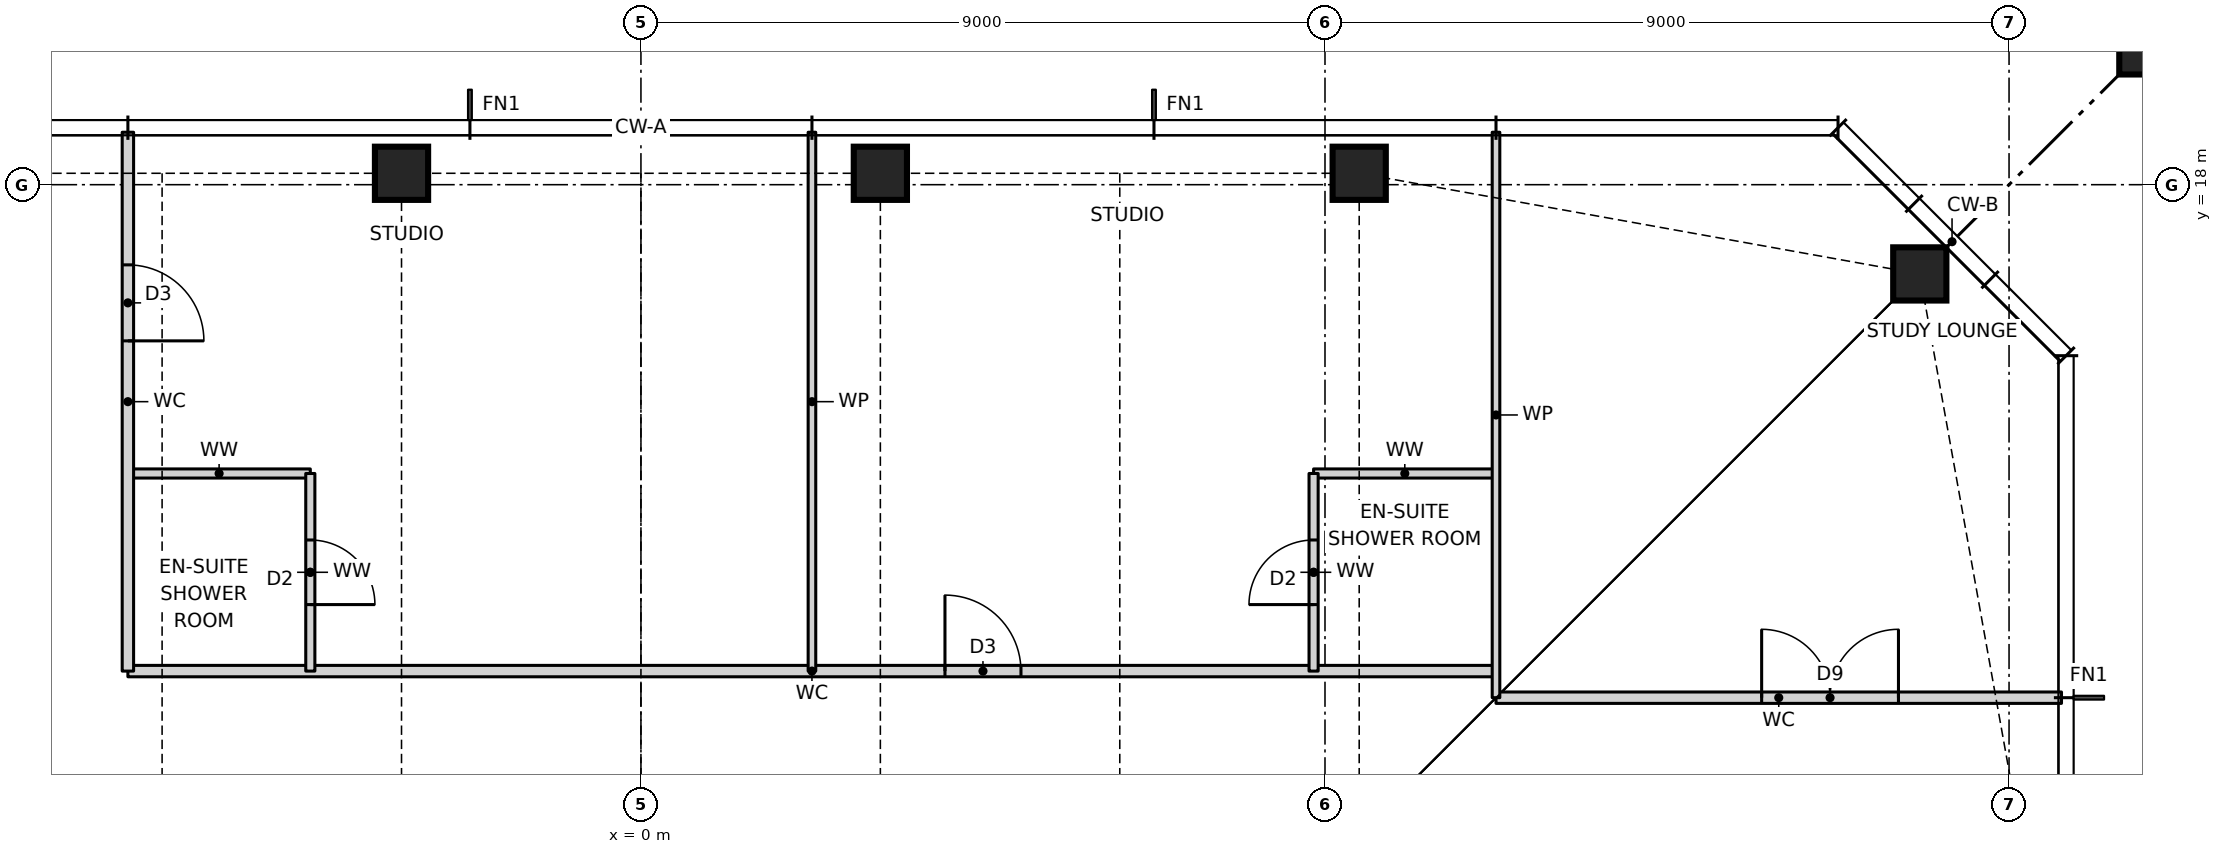
"""IFC4 building model, lengths in metres.
Left out: names, types, materials, properties, quantities, classifications, styles, units other than length and angle.
Written with IfcOpenShell. Run it as: python <this file> out.ifc"""

import sys

from ifc_helpers import new_model, si_unit, direction, frame, frame_2d, origin, origin_2d, place, context, subcontext, project, spatial, rectangle, hollow_rectangle, i_section, extrude, element, fill, save


model = new_model("IFC4")
c1 = context("Model", 3, precision=1e-05, world=origin(), true_north=direction((0.0, 1.0)))
c2 = subcontext(c1, "Body", "Model", "MODEL_VIEW")
j1 = project(units=[si_unit("LENGTHUNIT", "METRE"), si_unit("PLANEANGLEUNIT", "RADIAN")], contexts=[c1])
p1 = place(None, origin())
s1 = spatial("IfcSite", under=j1, at=p1, CompositionType="ELEMENT")
p2 = place(p1, origin())
s2 = spatial("IfcBuilding", under=s1, at=p2, CompositionType="ELEMENT")
p3 = place(p2, frame((0.0, 0.0, 202.0)))
s3 = spatial("IfcBuildingStorey", under=s2, at=p3, CompositionType="ELEMENT", Elevation=202.0)
for number, where, z_axis, x_axis in (
    (1, (16.826, 16.826, 0.0), (0.0, 0.0, 1.0), (1.0, 0.0, 0.0)),
    (2, (9.45, 18.15, 0.0), (0.0, 0.0, 1.0), (1.0, 0.0, 0.0)),
    (3, (3.15, 18.15, 0.0), (0.0, 0.0, 1.0), (1.0, 0.0, 0.0)),
    (4, (-3.15, 18.15, 0.0), (0.0, 0.0, 1.0), (1.0, 0.0, 0.0)),
):
    element("IfcColumn", number, at=place(p3, frame(where, z_axis=z_axis, x_axis=x_axis)), inside=s3, PredefinedType="COLUMN", context=c2, shape_type="SweptSolid", body=[
        extrude(hollow_rectangle(XDim=0.7, YDim=0.7, WallThickness=0.06, at=origin_2d()), origin(), (0.0, 0.0, 1.0), 3.5),
    ])
p4 = place(p3, frame((21.65, 21.65, 0.0), z_axis=(0.0, 0.0, 1.0), x_axis=(1.0, 0.0, 0.0)))
e5 = element("IfcColumn", 5, at=p4, inside=s3, PredefinedType="COLUMN", context=c2, shape_type="SweptSolid", body=[
    extrude(rectangle(XDim=4.4, YDim=4.4, at=origin_2d()), origin(), (0.0, 0.0, 1.0), 3.5),
    extrude(i_section(OverallWidth=0.478, OverallDepth=0.599, WebThickness=0.1, FlangeThickness=0.14, at=origin_2d()), origin(), (0.0, 0.0, 1.0), 3.5),
])
p5 = place(p3, frame((11.25, 11.25, 0.0), z_axis=(0.0, 0.0, 1.0), x_axis=(1.0, 0.0, 0.0)))
e6 = element("IfcWall", 6, at=p5, inside=s3, PredefinedType="PARTITIONING", context=c2, shape_type="SweptSolid", body=[
    extrude(rectangle(XDim=7.44, YDim=0.15, at=frame_2d((3.72, 0.0))), origin(), (0.0, 0.0, 1.0), 3.27),
])
p6 = place(p5, frame((3.495, 0.0, 0.0)))
e7 = element("IfcOpeningElement", 7, at=p6, cuts=e6, PredefinedType="OPENING", context=c2, shape_type="SweptSolid", body=[
    extrude(rectangle(XDim=1.8, YDim=2.1, at=frame_2d((0.9, 1.05))), frame((0.0, 0.085, 0.0), z_axis=(0.0, -1.0, 0.0), x_axis=(1.0, 0.0, 0.0)), (0.0, 0.0, 1.0), 0.17),
])
p7 = place(p3, frame((-6.75, 11.6, 0.0), z_axis=(0.0, 0.0, 1.0), x_axis=(1.0, 0.0, 0.0)))
e8 = element("IfcWall", 8, at=p7, inside=s3, PredefinedType="PARTITIONING", context=c2, shape_type="SweptSolid", body=[
    extrude(rectangle(XDim=18.0, YDim=0.15, at=frame_2d((9.0, 0.0))), origin(), (0.0, 0.0, 1.0), 3.27),
])
p8 = place(p7, frame((10.75, 0.0, 0.0)))
e9 = element("IfcOpeningElement", 9, at=p8, cuts=e8, PredefinedType="OPENING", context=c2, shape_type="SweptSolid", body=[
    extrude(rectangle(XDim=1.0, YDim=2.1, at=frame_2d((0.5, 1.05))), frame((0.0, 0.085, 0.0), z_axis=(0.0, -1.0, 0.0), x_axis=(1.0, 0.0, 0.0)), (0.0, 0.0, 1.0), 0.17),
])
for number, where, z_axis, x_axis in (
    (10, (-6.75, 14.2, 0.0), (0.0, 0.0, 1.0), (1.0, 0.0, 0.0)),
    (11, (8.85, 14.2, 0.0), (0.0, 0.0, 1.0), (1.0, 0.0, 0.0)),
):
    element("IfcWall", number, at=place(p3, frame(where, z_axis=z_axis, x_axis=x_axis)), inside=s3, PredefinedType="PARTITIONING", context=c2, shape_type="SweptSolid", body=[
        extrude(rectangle(XDim=2.4, YDim=0.12, at=frame_2d((1.2, 0.0))), origin(), (0.0, 0.0, 1.0), 3.27),
    ])
p9 = place(p3, frame((11.25, 11.25, 0.0), z_axis=(0.0, 0.0, 1.0), x_axis=(0.0, 1.0, 0.0)))
e12 = element("IfcWall", 12, at=p9, inside=s3, PredefinedType="PARTITIONING", context=c2, shape_type="SweptSolid", body=[
    extrude(rectangle(XDim=7.44, YDim=0.1, at=frame_2d((3.72, 0.0))), origin(), (0.0, 0.0, 1.0), 3.27),
])
p10 = place(p3, frame((8.85, 11.6, 0.0), z_axis=(0.0, 0.0, 1.0), x_axis=(0.0, 1.0, 0.0)))
e13 = element("IfcWall", 13, at=p10, inside=s3, PredefinedType="PARTITIONING", context=c2, shape_type="SweptSolid", body=[
    extrude(rectangle(XDim=2.6, YDim=0.12, at=frame_2d((1.3, 0.0))), origin(), (0.0, 0.0, 1.0), 3.27),
])
p11 = place(p10, frame((0.875, 0.0, 0.0)))
e14 = element("IfcOpeningElement", 14, at=p11, cuts=e13, PredefinedType="OPENING", context=c2, shape_type="SweptSolid", body=[
    extrude(rectangle(XDim=0.85, YDim=2.1, at=frame_2d((0.425, 1.05))), frame((0.0, 0.07, 0.0), z_axis=(0.0, -1.0, 0.0), x_axis=(1.0, 0.0, 0.0)), (0.0, 0.0, 1.0), 0.14),
])
p12 = place(p3, frame((2.25, 11.6, 0.0), z_axis=(0.0, 0.0, 1.0), x_axis=(0.0, 1.0, 0.0)))
e15 = element("IfcWall", 15, at=p12, inside=s3, PredefinedType="PARTITIONING", context=c2, shape_type="SweptSolid", body=[
    extrude(rectangle(XDim=7.09, YDim=0.1, at=frame_2d((3.545, 0.0))), origin(), (0.0, 0.0, 1.0), 3.27),
])
p13 = place(p3, frame((-4.35, 11.6, 0.0), z_axis=(0.0, 0.0, 1.0), x_axis=(0.0, 1.0, 0.0)))
e16 = element("IfcWall", 16, at=p13, inside=s3, PredefinedType="PARTITIONING", context=c2, shape_type="SweptSolid", body=[
    extrude(rectangle(XDim=2.6, YDim=0.12, at=frame_2d((1.3, 0.0))), origin(), (0.0, 0.0, 1.0), 3.27),
])
p14 = place(p13, frame((0.875, 0.0, 0.0)))
e17 = element("IfcOpeningElement", 17, at=p14, cuts=e16, PredefinedType="OPENING", context=c2, shape_type="SweptSolid", body=[
    extrude(rectangle(XDim=0.85, YDim=2.1, at=frame_2d((0.425, 1.05))), frame((0.0, 0.07, 0.0), z_axis=(0.0, -1.0, 0.0), x_axis=(1.0, 0.0, 0.0)), (0.0, 0.0, 1.0), 0.14),
])
p15 = place(p3, frame((-6.75, 11.6, 0.0), z_axis=(0.0, 0.0, 1.0), x_axis=(0.0, 1.0, 0.0)))
e18 = element("IfcWall", 18, at=p15, inside=s3, PredefinedType="PARTITIONING", context=c2, shape_type="SweptSolid", body=[
    extrude(rectangle(XDim=7.09, YDim=0.15, at=frame_2d((3.545, 0.0))), origin(), (0.0, 0.0, 1.0), 3.27),
])
p16 = place(p15, frame((4.345, 0.0, 0.0)))
e19 = element("IfcOpeningElement", 19, at=p16, cuts=e18, PredefinedType="OPENING", context=c2, shape_type="SweptSolid", body=[
    extrude(rectangle(XDim=1.0, YDim=2.1, at=frame_2d((0.5, 1.05))), frame((0.0, 0.085, 0.0), z_axis=(0.0, -1.0, 0.0), x_axis=(1.0, 0.0, 0.0)), (0.0, 0.0, 1.0), 0.17),
])
p17 = place(p8, origin())
e20 = element("IfcDoor", 20, at=p17, inside=s3, OperationType="SINGLE_SWING_LEFT", PredefinedType="DOOR", context=c2, shape_type="SweptSolid", body=[
    extrude(rectangle(XDim=1.0, YDim=2.1, at=frame_2d((0.5, 1.05))), frame((0.0, 0.025, 0.0), z_axis=(0.0, -1.0, 0.0), x_axis=(1.0, 0.0, 0.0)), (0.0, 0.0, 1.0), 0.05),
])
fill(e9, e20)
p18 = place(p11, origin())
e21 = element("IfcDoor", 21, at=p18, inside=s3, OperationType="SINGLE_SWING_LEFT", PredefinedType="DOOR", context=c2, shape_type="SweptSolid", body=[
    extrude(rectangle(XDim=0.85, YDim=2.1, at=frame_2d((0.425, 1.05))), frame((0.0, 0.025, 0.0), z_axis=(0.0, -1.0, 0.0), x_axis=(1.0, 0.0, 0.0)), (0.0, 0.0, 1.0), 0.05),
])
fill(e14, e21)
p19 = place(p16, frame((1.0, 0.0, 0.0), z_axis=(0.0, 0.0, 1.0), x_axis=(-1.0, 0.0, 0.0)))
e22 = element("IfcDoor", 22, at=p19, inside=s3, OperationType="SINGLE_SWING_RIGHT", PredefinedType="DOOR", context=c2, shape_type="SweptSolid", body=[
    extrude(rectangle(XDim=1.0, YDim=2.1, at=frame_2d((0.5, 1.05))), frame((0.0, 0.025, 0.0), z_axis=(0.0, -1.0, 0.0), x_axis=(1.0, 0.0, 0.0)), (0.0, 0.0, 1.0), 0.05),
])
fill(e19, e22)
p20 = place(p14, frame((0.85, 0.0, 0.0), z_axis=(0.0, 0.0, 1.0), x_axis=(-1.0, 0.0, 0.0)))
e23 = element("IfcDoor", 23, at=p20, inside=s3, OperationType="SINGLE_SWING_RIGHT", PredefinedType="DOOR", context=c2, shape_type="SweptSolid", body=[
    extrude(rectangle(XDim=0.85, YDim=2.1, at=frame_2d((0.425, 1.05))), frame((0.0, 0.025, 0.0), z_axis=(0.0, -1.0, 0.0), x_axis=(1.0, 0.0, 0.0)), (0.0, 0.0, 1.0), 0.05),
])
fill(e17, e23)
p21 = place(p6, origin())
e24 = element("IfcDoor", 24, at=p21, inside=s3, OperationType="DOUBLE_DOOR_SINGLE_SWING", PredefinedType="DOOR", context=c2, shape_type="SweptSolid", body=[
    extrude(rectangle(XDim=1.8, YDim=2.1, at=frame_2d((0.9, 1.05))), frame((0.0, 0.025, 0.0), z_axis=(0.0, -1.0, 0.0), x_axis=(1.0, 0.0, 0.0)), (0.0, 0.0, 1.0), 0.05),
])
fill(e7, e24)
save(model, sys.argv[1])
